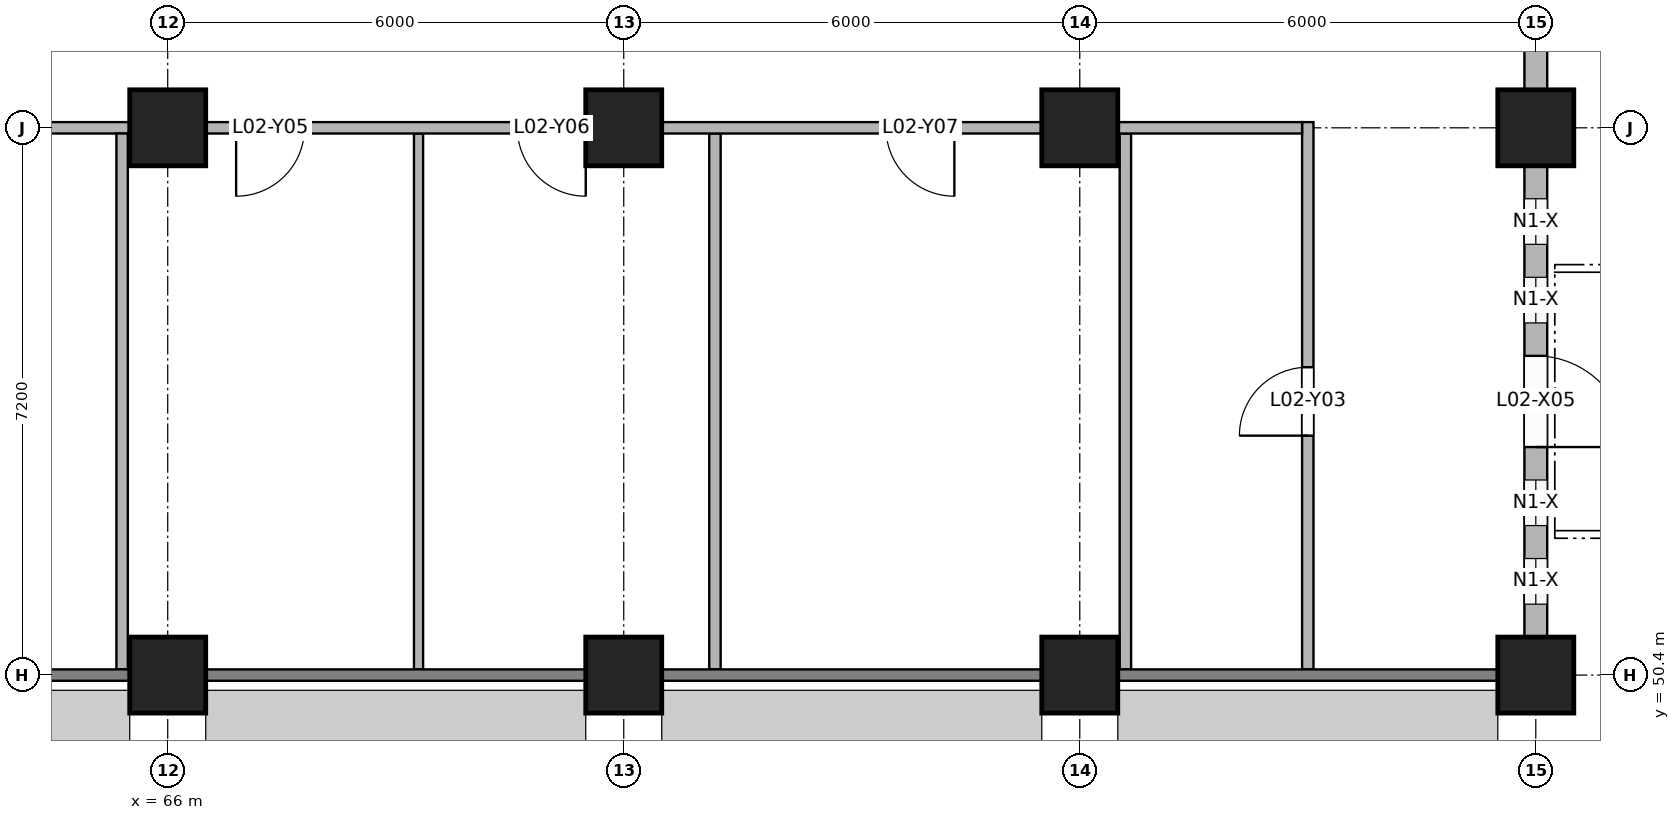
"""IFC4 building model, lengths in metres.
Left out: names, types, materials, properties, quantities, classifications, styles, units other than length and angle.
Written with IfcOpenShell. Run it as: python <this file> out.ifc"""

import sys

from ifc_helpers import new_model, si_unit, direction, frame, frame_2d, origin, origin_2d, place, context, subcontext, project, spatial, rectangle, extrude, element, fill, save


model = new_model("IFC4")
c1 = context("Model", 3, precision=1e-05, world=origin(), true_north=direction((0.0, 1.0)))
c2 = subcontext(c1, "Body", "Model", "MODEL_VIEW")
j1 = project(units=[si_unit("LENGTHUNIT", "METRE"), si_unit("PLANEANGLEUNIT", "RADIAN")], contexts=[c1])
p1 = place(None, origin())
s1 = spatial("IfcSite", under=j1, at=p1, CompositionType="ELEMENT")
p2 = place(p1, origin())
s2 = spatial("IfcBuilding", under=s1, at=p2, CompositionType="ELEMENT")
p3 = place(p2, frame((0.0, 0.0, 8.4)))
s3 = spatial("IfcBuildingStorey", under=s2, at=p3, CompositionType="ELEMENT", Elevation=8.4)
for number, where, z_axis, x_axis in (
    (1, (66.0, 50.4, 0.0), (0.0, 0.0, 1.0), (1.0, 0.0, 0.0)),
    (2, (72.0, 50.4, 0.0), (0.0, 0.0, 1.0), (1.0, 0.0, 0.0)),
    (3, (78.0, 50.4, 0.0), (0.0, 0.0, 1.0), (1.0, 0.0, 0.0)),
    (4, (84.0, 50.4, 0.0), (0.0, 0.0, 1.0), (1.0, 0.0, 0.0)),
    (5, (66.0, 57.6, 0.0), (0.0, 0.0, 1.0), (1.0, 0.0, 0.0)),
    (6, (72.0, 57.6, 0.0), (0.0, 0.0, 1.0), (1.0, 0.0, 0.0)),
    (7, (78.0, 57.6, 0.0), (0.0, 0.0, 1.0), (1.0, 0.0, 0.0)),
    (8, (84.0, 57.6, 0.0), (0.0, 0.0, 1.0), (1.0, 0.0, 0.0)),
):
    element("IfcColumn", number, at=place(p3, frame(where, z_axis=z_axis, x_axis=x_axis)), inside=s3, PredefinedType="COLUMN", context=c2, shape_type="SweptSolid", body=[
        extrude(rectangle(XDim=1.0, YDim=1.0, at=origin_2d()), origin(), (0.0, 0.0, 1.0), 4.0),
    ])
p4 = place(p3, frame((84.0, 50.9, 0.0), z_axis=(0.0, 0.0, 1.0), x_axis=(0.0, 1.0, 0.0)))
e9 = element("IfcWall", 9, at=p4, inside=s3, PredefinedType="SOLIDWALL", context=c2, shape_type="SweptSolid", body=[
    extrude(rectangle(XDim=6.2, YDim=0.3, at=frame_2d((3.1, 0.0))), origin(), (0.0, 0.0, 1.0), 3.1),
])
p5 = place(p4, frame((2.5, 0.0, 0.0)))
e10 = element("IfcOpeningElement", 10, at=p5, cuts=e9, PredefinedType="OPENING", context=c2, shape_type="SweptSolid", body=[
    extrude(rectangle(XDim=1.2, YDim=2.4, at=frame_2d((0.6, 1.2))), frame((0.0, 0.16, 0.0), z_axis=(0.0, -1.0, 0.0), x_axis=(1.0, 0.0, 0.0)), (0.0, 0.0, 1.0), 0.32),
])
p6 = place(p4, frame((0.433, 0.0, 0.9)))
e11 = element("IfcOpeningElement", 11, at=p6, cuts=e9, PredefinedType="OPENING", context=c2, shape_type="SweptSolid", body=[
    extrude(rectangle(XDim=0.6, YDim=1.9, at=frame_2d((0.3, 0.95))), frame((0.0, 0.16, 0.0), z_axis=(0.0, -1.0, 0.0), x_axis=(1.0, 0.0, 0.0)), (0.0, 0.0, 1.0), 0.32),
])
p7 = place(p4, frame((1.467, 0.0, 0.9)))
e12 = element("IfcOpeningElement", 12, at=p7, cuts=e9, PredefinedType="OPENING", context=c2, shape_type="SweptSolid", body=[
    extrude(rectangle(XDim=0.6, YDim=1.9, at=frame_2d((0.3, 0.95))), frame((0.0, 0.16, 0.0), z_axis=(0.0, -1.0, 0.0), x_axis=(1.0, 0.0, 0.0)), (0.0, 0.0, 1.0), 0.32),
])
p8 = place(p4, frame((4.133, 0.0, 0.9)))
e13 = element("IfcOpeningElement", 13, at=p8, cuts=e9, PredefinedType="OPENING", context=c2, shape_type="SweptSolid", body=[
    extrude(rectangle(XDim=0.6, YDim=1.9, at=frame_2d((0.3, 0.95))), frame((0.0, 0.16, 0.0), z_axis=(0.0, -1.0, 0.0), x_axis=(1.0, 0.0, 0.0)), (0.0, 0.0, 1.0), 0.32),
])
p9 = place(p4, frame((5.167, 0.0, 0.9)))
e14 = element("IfcOpeningElement", 14, at=p9, cuts=e9, PredefinedType="OPENING", context=c2, shape_type="SweptSolid", body=[
    extrude(rectangle(XDim=0.6, YDim=1.9, at=frame_2d((0.3, 0.95))), frame((0.0, 0.16, 0.0), z_axis=(0.0, -1.0, 0.0), x_axis=(1.0, 0.0, 0.0)), (0.0, 0.0, 1.0), 0.32),
])
p10 = place(p3, frame((84.0, 58.1, 0.0), z_axis=(0.0, 0.0, 1.0), x_axis=(0.0, 1.0, 0.0)))
e15 = element("IfcWall", 15, at=p10, inside=s3, PredefinedType="SOLIDWALL", context=c2, shape_type="SweptSolid", body=[
    extrude(rectangle(XDim=6.7, YDim=0.3, at=frame_2d((3.35, 0.0))), origin(), (0.0, 0.0, 1.0), 3.1),
])
p11 = place(p10, frame((0.51, 0.0, 0.9)))
e16 = element("IfcOpeningElement", 16, at=p11, cuts=e15, PredefinedType="OPENING", context=c2, shape_type="SweptSolid", body=[
    extrude(rectangle(XDim=0.6, YDim=1.9, at=frame_2d((0.3, 0.95))), frame((0.0, 0.16, 0.0), z_axis=(0.0, -1.0, 0.0), x_axis=(1.0, 0.0, 0.0)), (0.0, 0.0, 1.0), 0.32),
])
p12 = place(p10, frame((2.8, 0.0, 0.9)))
e17 = element("IfcOpeningElement", 17, at=p12, cuts=e15, PredefinedType="OPENING", context=c2, shape_type="SweptSolid", body=[
    extrude(rectangle(XDim=0.6, YDim=1.9, at=frame_2d((0.3, 0.95))), frame((0.0, 0.16, 0.0), z_axis=(0.0, -1.0, 0.0), x_axis=(1.0, 0.0, 0.0)), (0.0, 0.0, 1.0), 0.32),
])
p13 = place(p10, frame((5.34, 0.0, 0.9)))
e18 = element("IfcOpeningElement", 18, at=p13, cuts=e15, PredefinedType="OPENING", context=c2, shape_type="SweptSolid", body=[
    extrude(rectangle(XDim=0.6, YDim=1.9, at=frame_2d((0.3, 0.95))), frame((0.0, 0.16, 0.0), z_axis=(0.0, -1.0, 0.0), x_axis=(1.0, 0.0, 0.0)), (0.0, 0.0, 1.0), 0.32),
])
p14 = place(p3, frame((65.4, 50.475, 0.0), z_axis=(0.0, 0.0, 1.0), x_axis=(0.0, 1.0, 0.0)))
e19 = element("IfcWall", 19, at=p14, inside=s3, PredefinedType="PARTITIONING", context=c2, shape_type="SweptSolid", body=[
    extrude(rectangle(XDim=7.05, YDim=0.15, at=frame_2d((3.525, 0.0))), origin(), (0.0, 0.0, 1.0), 3.2),
])
p15 = place(p3, frame((69.3, 50.475, 0.0), z_axis=(0.0, 0.0, 1.0), x_axis=(0.0, 1.0, 0.0)))
e20 = element("IfcWall", 20, at=p15, inside=s3, PredefinedType="PARTITIONING", context=c2, shape_type="SweptSolid", body=[
    extrude(rectangle(XDim=7.05, YDim=0.12, at=frame_2d((3.525, 0.0))), origin(), (0.0, 0.0, 1.0), 3.2),
])
for number, where, z_axis, x_axis in (
    (21, (73.2, 50.475, 0.0), (0.0, 0.0, 1.0), (0.0, 1.0, 0.0)),
    (22, (78.6, 50.475, 0.0), (0.0, 0.0, 1.0), (0.0, 1.0, 0.0)),
):
    element("IfcWall", number, at=place(p3, frame(where, z_axis=z_axis, x_axis=x_axis)), inside=s3, PredefinedType="PARTITIONING", context=c2, shape_type="SweptSolid", body=[
        extrude(rectangle(XDim=7.05, YDim=0.15, at=frame_2d((3.525, 0.0))), origin(), (0.0, 0.0, 1.0), 3.2),
    ])
p16 = place(p3, frame((81.0, 50.475, 0.0), z_axis=(0.0, 0.0, 1.0), x_axis=(0.0, 1.0, 0.0)))
e23 = element("IfcWall", 23, at=p16, inside=s3, PredefinedType="PARTITIONING", context=c2, shape_type="SweptSolid", body=[
    extrude(rectangle(XDim=7.2, YDim=0.15, at=frame_2d((3.6, 0.0))), origin(), (0.0, 0.0, 1.0), 3.2),
])
p17 = place(p16, frame((3.075, 0.0, 0.0)))
e24 = element("IfcOpeningElement", 24, at=p17, cuts=e23, PredefinedType="OPENING", context=c2, shape_type="SweptSolid", body=[
    extrude(rectangle(XDim=0.9, YDim=2.1, at=frame_2d((0.45, 1.05))), frame((0.0, 0.085, 0.0), z_axis=(0.0, -1.0, 0.0), x_axis=(1.0, 0.0, 0.0)), (0.0, 0.0, 1.0), 0.17),
])
p18 = place(p3, frame((57.075, 57.6, 0.0), z_axis=(0.0, 0.0, 1.0), x_axis=(1.0, 0.0, 0.0)))
e25 = element("IfcWall", 25, at=p18, inside=s3, PredefinedType="PARTITIONING", context=c2, shape_type="SweptSolid", body=[
    extrude(rectangle(XDim=23.85, YDim=0.15, at=frame_2d((11.925, 0.0))), origin(), (0.0, 0.0, 1.0), 3.2),
])
p19 = place(p18, frame((3.525, 0.0, 0.0)))
e26 = element("IfcOpeningElement", 26, at=p19, cuts=e25, PredefinedType="OPENING", context=c2, shape_type="SweptSolid", body=[
    extrude(rectangle(XDim=1.2, YDim=2.1, at=frame_2d((0.6, 1.05))), frame((0.0, 0.085, 0.0), z_axis=(0.0, -1.0, 0.0), x_axis=(1.0, 0.0, 0.0)), (0.0, 0.0, 1.0), 0.17),
])
p20 = place(p18, frame((9.825, 0.0, 0.0)))
e27 = element("IfcOpeningElement", 27, at=p20, cuts=e25, PredefinedType="OPENING", context=c2, shape_type="SweptSolid", body=[
    extrude(rectangle(XDim=0.9, YDim=2.1, at=frame_2d((0.45, 1.05))), frame((0.0, 0.085, 0.0), z_axis=(0.0, -1.0, 0.0), x_axis=(1.0, 0.0, 0.0)), (0.0, 0.0, 1.0), 0.17),
])
p21 = place(p18, frame((13.525, 0.0, 0.0)))
e28 = element("IfcOpeningElement", 28, at=p21, cuts=e25, PredefinedType="OPENING", context=c2, shape_type="SweptSolid", body=[
    extrude(rectangle(XDim=0.9, YDim=2.1, at=frame_2d((0.45, 1.05))), frame((0.0, 0.085, 0.0), z_axis=(0.0, -1.0, 0.0), x_axis=(1.0, 0.0, 0.0)), (0.0, 0.0, 1.0), 0.17),
])
p22 = place(p18, frame((18.375, 0.0, 0.0)))
e29 = element("IfcOpeningElement", 29, at=p22, cuts=e25, PredefinedType="OPENING", context=c2, shape_type="SweptSolid", body=[
    extrude(rectangle(XDim=0.9, YDim=2.1, at=frame_2d((0.45, 1.05))), frame((0.0, 0.085, 0.0), z_axis=(0.0, -1.0, 0.0), x_axis=(1.0, 0.0, 0.0)), (0.0, 0.0, 1.0), 0.17),
])
p23 = place(p5, frame((1.2, 0.0, 0.0), z_axis=(0.0, 0.0, 1.0), x_axis=(-1.0, 0.0, 0.0)))
e30 = element("IfcDoor", 30, at=p23, inside=s3, OperationType="SINGLE_SWING_RIGHT", PredefinedType="DOOR", context=c2, shape_type="SweptSolid", body=[
    extrude(rectangle(XDim=1.2, YDim=2.4, at=frame_2d((0.6, 1.2))), frame((0.0, 0.025, 0.0), z_axis=(0.0, -1.0, 0.0), x_axis=(1.0, 0.0, 0.0)), (0.0, 0.0, 1.0), 0.05),
])
fill(e10, e30)
p24 = place(p6, origin())
e31 = element("IfcWindow", 31, at=p24, inside=s3, PartitioningType="SINGLE_PANEL", PredefinedType="WINDOW", context=c2, shape_type="SweptSolid", body=[
    extrude(rectangle(XDim=0.6, YDim=1.9, at=frame_2d((0.3, 0.95))), frame((0.0, 0.03, 0.0), z_axis=(0.0, -1.0, 0.0), x_axis=(1.0, 0.0, 0.0)), (0.0, 0.0, 1.0), 0.06),
])
fill(e11, e31)
p25 = place(p7, origin())
e32 = element("IfcWindow", 32, at=p25, inside=s3, PartitioningType="SINGLE_PANEL", PredefinedType="WINDOW", context=c2, shape_type="SweptSolid", body=[
    extrude(rectangle(XDim=0.6, YDim=1.9, at=frame_2d((0.3, 0.95))), frame((0.0, 0.03, 0.0), z_axis=(0.0, -1.0, 0.0), x_axis=(1.0, 0.0, 0.0)), (0.0, 0.0, 1.0), 0.06),
])
fill(e12, e32)
p26 = place(p8, origin())
e33 = element("IfcWindow", 33, at=p26, inside=s3, PartitioningType="SINGLE_PANEL", PredefinedType="WINDOW", context=c2, shape_type="SweptSolid", body=[
    extrude(rectangle(XDim=0.6, YDim=1.9, at=frame_2d((0.3, 0.95))), frame((0.0, 0.03, 0.0), z_axis=(0.0, -1.0, 0.0), x_axis=(1.0, 0.0, 0.0)), (0.0, 0.0, 1.0), 0.06),
])
fill(e13, e33)
p27 = place(p9, origin())
e34 = element("IfcWindow", 34, at=p27, inside=s3, PartitioningType="SINGLE_PANEL", PredefinedType="WINDOW", context=c2, shape_type="SweptSolid", body=[
    extrude(rectangle(XDim=0.6, YDim=1.9, at=frame_2d((0.3, 0.95))), frame((0.0, 0.03, 0.0), z_axis=(0.0, -1.0, 0.0), x_axis=(1.0, 0.0, 0.0)), (0.0, 0.0, 1.0), 0.06),
])
fill(e14, e34)
p28 = place(p17, origin())
e35 = element("IfcDoor", 35, at=p28, inside=s3, OperationType="SINGLE_SWING_LEFT", PredefinedType="DOOR", context=c2, shape_type="SweptSolid", body=[
    extrude(rectangle(XDim=0.9, YDim=2.1, at=frame_2d((0.45, 1.05))), frame((0.0, 0.025, 0.0), z_axis=(0.0, -1.0, 0.0), x_axis=(1.0, 0.0, 0.0)), (0.0, 0.0, 1.0), 0.05),
])
fill(e24, e35)
p29 = place(p20, frame((0.9, 0.0, 0.0), z_axis=(0.0, 0.0, 1.0), x_axis=(-1.0, 0.0, 0.0)))
e36 = element("IfcDoor", 36, at=p29, inside=s3, OperationType="SINGLE_SWING_RIGHT", PredefinedType="DOOR", context=c2, shape_type="SweptSolid", body=[
    extrude(rectangle(XDim=0.9, YDim=2.1, at=frame_2d((0.45, 1.05))), frame((0.0, 0.025, 0.0), z_axis=(0.0, -1.0, 0.0), x_axis=(1.0, 0.0, 0.0)), (0.0, 0.0, 1.0), 0.05),
])
fill(e27, e36)
p30 = place(p21, frame((0.9, 0.0, 0.0), z_axis=(0.0, 0.0, 1.0), x_axis=(-1.0, 0.0, 0.0)))
e37 = element("IfcDoor", 37, at=p30, inside=s3, OperationType="SINGLE_SWING_LEFT", PredefinedType="DOOR", context=c2, shape_type="SweptSolid", body=[
    extrude(rectangle(XDim=0.9, YDim=2.1, at=frame_2d((0.45, 1.05))), frame((0.0, 0.025, 0.0), z_axis=(0.0, -1.0, 0.0), x_axis=(1.0, 0.0, 0.0)), (0.0, 0.0, 1.0), 0.05),
])
fill(e28, e37)
p31 = place(p22, frame((0.9, 0.0, 0.0), z_axis=(0.0, 0.0, 1.0), x_axis=(-1.0, 0.0, 0.0)))
e38 = element("IfcDoor", 38, at=p31, inside=s3, OperationType="SINGLE_SWING_LEFT", PredefinedType="DOOR", context=c2, shape_type="SweptSolid", body=[
    extrude(rectangle(XDim=0.9, YDim=2.1, at=frame_2d((0.45, 1.05))), frame((0.0, 0.025, 0.0), z_axis=(0.0, -1.0, 0.0), x_axis=(1.0, 0.0, 0.0)), (0.0, 0.0, 1.0), 0.05),
])
fill(e29, e38)
save(model, sys.argv[1])
